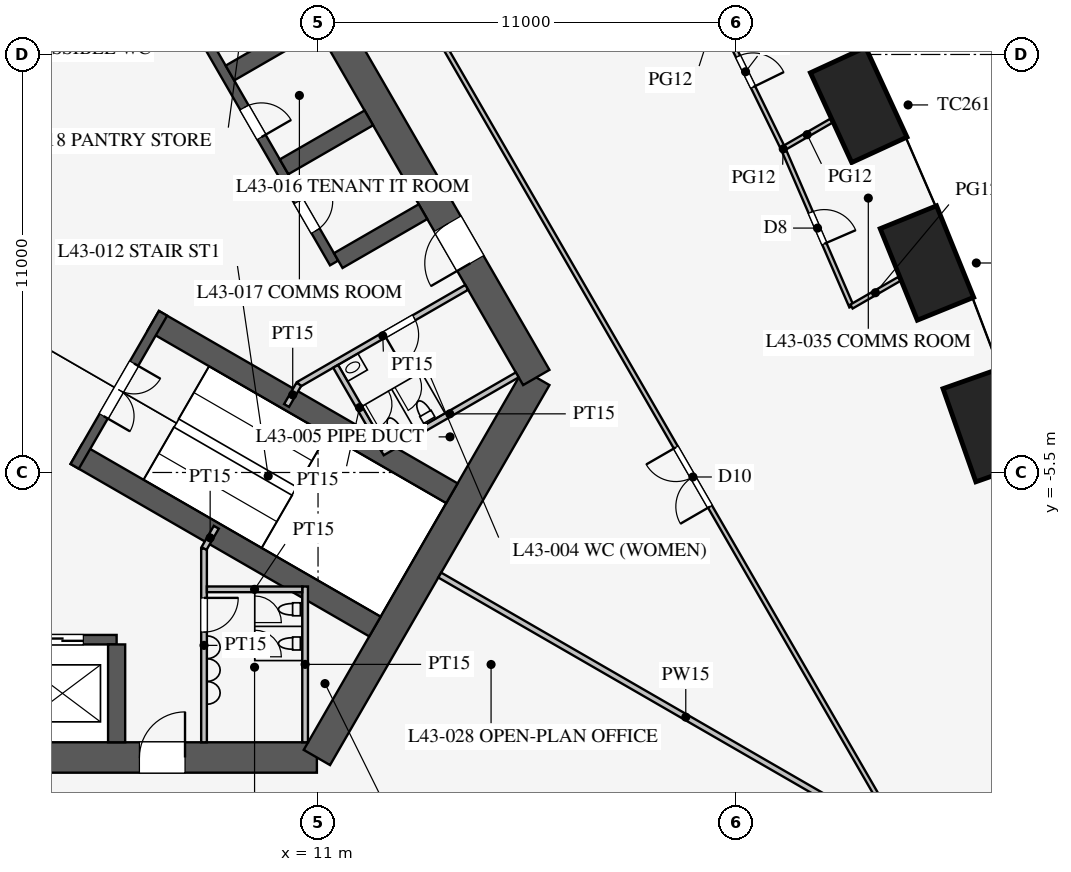
"""IFC4 building model, lengths in metres.
Left out: names, types, materials, properties, quantities, classifications, styles, units other than length and angle.
Written with IfcOpenShell. Run it as: python <this file> out.ifc"""

import sys

from ifc_helpers import new_model, si_unit, direction, frame, frame_2d, origin, origin_2d, place, context, subcontext, project, spatial, rectangle, extrude, element, fill, save


model = new_model("IFC4")
c1 = context("Model", 3, precision=1e-05, world=origin(), true_north=direction((0.0, 1.0)))
c2 = subcontext(c1, "Body", "Model", "MODEL_VIEW")
j1 = project(units=[si_unit("LENGTHUNIT", "METRE"), si_unit("PLANEANGLEUNIT", "RADIAN")], contexts=[c1])
p1 = place(None, origin())
s1 = spatial("IfcSite", under=j1, at=p1, CompositionType="ELEMENT")
p2 = place(p1, origin())
s2 = spatial("IfcBuilding", under=s1, at=p2, CompositionType="ELEMENT")
p3 = place(p2, frame((0.0, 0.0, 189.7)))
s3 = spatial("IfcBuildingStorey", under=s2, at=p3, CompositionType="ELEMENT", Elevation=189.7)
for number, where, z_axis, x_axis in (
    (1, (28.632, -4.254, 0.0), (0.0, 0.0, 1.0), (-0.332, 0.943, 0.0)),
    (2, (27.022, 0.013, 0.0), (0.0, 0.0, 1.0), (-0.376, 0.927, 0.0)),
    (3, (25.227, 4.172, 0.0), (0.0, 0.0, 1.0), (-0.418, 0.908, 0.0)),
):
    element("IfcColumn", number, at=place(p3, frame(where, z_axis=z_axis, x_axis=x_axis)), inside=s3, PredefinedType="COLUMN", context=c2, shape_type="SweptSolid", body=[
        extrude(rectangle(XDim=2.6, YDim=1.6, at=origin_2d()), origin(), (0.0, 0.0, 1.0), 4.2),
    ])
p4 = place(p3, frame((-10.97, -13.0, 0.0), z_axis=(0.0, 0.0, 1.0), x_axis=(1.0, 0.0, 0.0)))
e4 = element("IfcWall", 4, at=p4, inside=s3, PredefinedType="SHEAR", context=c2, shape_type="SweptSolid", body=[
    extrude(rectangle(XDim=21.939, YDim=0.8, at=frame_2d((10.97, 0.0))), origin(), (0.0, 0.0, 1.0), 4.2),
])
p5 = place(p4, frame((17.27, 0.0, 0.0)))
e5 = element("IfcOpeningElement", 5, at=p5, cuts=e4, PredefinedType="OPENING", context=c2, shape_type="SweptSolid", body=[
    extrude(rectangle(XDim=1.2, YDim=2.1, at=frame_2d((0.6, 1.05))), frame((0.0, 0.41, 0.0), z_axis=(0.0, -1.0, 0.0), x_axis=(1.0, 0.0, 0.0)), (0.0, 0.0, 1.0), 0.82),
])
p6 = place(p4, frame((3.47, 0.0, 0.0)))
e6 = element("IfcOpeningElement", 6, at=p6, cuts=e4, PredefinedType="OPENING", context=c2, shape_type="SweptSolid", body=[
    extrude(rectangle(XDim=1.2, YDim=2.1, at=frame_2d((0.6, 1.05))), frame((0.0, 0.41, 0.0), z_axis=(0.0, -1.0, 0.0), x_axis=(1.0, 0.0, 0.0)), (0.0, 0.0, 1.0), 0.82),
])
p7 = place(p3, frame((10.97, -13.0, 0.0), z_axis=(0.0, 0.0, 1.0), x_axis=(0.499995765644, 0.866027848477, 0.0)))
e7 = element("IfcWall", 7, at=p7, inside=s3, PredefinedType="SHEAR", context=c2, shape_type="SweptSolid", body=[
    extrude(rectangle(XDim=11.547, YDim=0.8, at=frame_2d((5.773, 0.0))), origin(), (0.0, 0.0, 1.0), 4.2),
])
p8 = place(p3, frame((16.743, -3.0, 0.0), z_axis=(0.0, 0.0, 1.0), x_axis=(-0.500002442456, 0.866023993627, 0.0)))
e8 = element("IfcWall", 8, at=p8, inside=s3, PredefinedType="SHEAR", context=c2, shape_type="SweptSolid", body=[
    extrude(rectangle(XDim=21.939, YDim=0.8, at=frame_2d((10.97, 0.0))), origin(), (0.0, 0.0, 1.0), 4.2),
])
p9 = place(p8, frame((17.27, 0.0, 0.0)))
e9 = element("IfcOpeningElement", 9, at=p9, cuts=e8, PredefinedType="OPENING", context=c2, shape_type="SweptSolid", body=[
    extrude(rectangle(XDim=1.2, YDim=2.1, at=frame_2d((0.6, 1.05))), frame((0.0, 0.41, 0.0), z_axis=(0.0, -1.0, 0.0), x_axis=(1.0, 0.0, 0.0)), (0.0, 0.0, 1.0), 0.82),
])
p10 = place(p8, frame((3.47, 0.0, 0.0)))
e10 = element("IfcOpeningElement", 10, at=p10, cuts=e8, PredefinedType="OPENING", context=c2, shape_type="SweptSolid", body=[
    extrude(rectangle(XDim=1.2, YDim=2.1, at=frame_2d((0.6, 1.05))), frame((0.0, 0.41, 0.0), z_axis=(0.0, -1.0, 0.0), x_axis=(1.0, 0.0, 0.0)), (0.0, 0.0, 1.0), 0.82),
])
p11 = place(p3, frame((-5.7, -9.9, 0.0), z_axis=(0.0, 0.0, 1.0), x_axis=(1.0, 0.0, 0.0)))
e11 = element("IfcWall", 11, at=p11, inside=s3, PredefinedType="SHEAR", context=c2, shape_type="SweptSolid", body=[
    extrude(rectangle(XDim=11.4, YDim=0.25, at=frame_2d((5.7, 0.0))), origin(), (0.0, 0.0, 1.0), 4.2),
])
p12 = place(p11, frame((0.875, 0.0, 0.0)))
e12 = element("IfcOpeningElement", 12, at=p12, cuts=e11, PredefinedType="OPENING", context=c2, shape_type="SweptSolid", body=[
    extrude(rectangle(XDim=1.1, YDim=2.2, at=frame_2d((0.55, 1.1))), frame((0.0, 0.135, 0.0), z_axis=(0.0, -1.0, 0.0), x_axis=(1.0, 0.0, 0.0)), (0.0, 0.0, 1.0), 0.27),
])
p13 = place(p11, frame((3.725, 0.0, 0.0)))
e13 = element("IfcOpeningElement", 13, at=p13, cuts=e11, PredefinedType="OPENING", context=c2, shape_type="SweptSolid", body=[
    extrude(rectangle(XDim=1.1, YDim=2.2, at=frame_2d((0.55, 1.1))), frame((0.0, 0.135, 0.0), z_axis=(0.0, -1.0, 0.0), x_axis=(1.0, 0.0, 0.0)), (0.0, 0.0, 1.0), 0.27),
])
p14 = place(p11, frame((6.575, 0.0, 0.0)))
e14 = element("IfcOpeningElement", 14, at=p14, cuts=e11, PredefinedType="OPENING", context=c2, shape_type="SweptSolid", body=[
    extrude(rectangle(XDim=1.1, YDim=2.2, at=frame_2d((0.55, 1.1))), frame((0.0, 0.135, 0.0), z_axis=(0.0, -1.0, 0.0), x_axis=(1.0, 0.0, 0.0)), (0.0, 0.0, 1.0), 0.27),
])
p15 = place(p11, frame((9.425, 0.0, 0.0)))
e15 = element("IfcOpeningElement", 15, at=p15, cuts=e11, PredefinedType="OPENING", context=c2, shape_type="SweptSolid", body=[
    extrude(rectangle(XDim=1.1, YDim=2.2, at=frame_2d((0.55, 1.1))), frame((0.0, 0.135, 0.0), z_axis=(0.0, -1.0, 0.0), x_axis=(1.0, 0.0, 0.0)), (0.0, 0.0, 1.0), 0.27),
])
p16 = place(p3, frame((5.7, -10.025, 0.0), z_axis=(0.0, 0.0, 1.0), x_axis=(0.0, -1.0, 0.0)))
e16 = element("IfcWall", 16, at=p16, inside=s3, PredefinedType="SHEAR", context=c2, shape_type="SweptSolid", body=[
    extrude(rectangle(XDim=2.575, YDim=0.45, at=frame_2d((1.288, 0.0))), origin(), (0.0, 0.0, 1.0), 4.2),
])
p17 = place(p3, frame((11.424, 0.014, 0.0), z_axis=(0.0, 0.0, 1.0), x_axis=(-0.500001763848, 0.866024385424, 0.0)))
e17 = element("IfcWall", 17, at=p17, inside=s3, PredefinedType="SHEAR", context=c2, shape_type="SweptSolid", body=[
    extrude(rectangle(XDim=11.4, YDim=0.25, at=frame_2d((5.7, 0.0))), origin(), (0.0, 0.0, 1.0), 4.2),
])
p18 = place(p17, frame((0.975, 0.0, 0.0)))
e18 = element("IfcOpeningElement", 18, at=p18, cuts=e17, PredefinedType="OPENING", context=c2, shape_type="SweptSolid", body=[
    extrude(rectangle(XDim=0.9, YDim=2.1, at=frame_2d((0.45, 1.05))), frame((0.0, 0.135, 0.0), z_axis=(0.0, -1.0, 0.0), x_axis=(1.0, 0.0, 0.0)), (0.0, 0.0, 1.0), 0.27),
])
p19 = place(p17, frame((3.825, 0.0, 0.0)))
e19 = element("IfcOpeningElement", 19, at=p19, cuts=e17, PredefinedType="OPENING", context=c2, shape_type="SweptSolid", body=[
    extrude(rectangle(XDim=0.9, YDim=2.1, at=frame_2d((0.45, 1.05))), frame((0.0, 0.135, 0.0), z_axis=(0.0, -1.0, 0.0), x_axis=(1.0, 0.0, 0.0)), (0.0, 0.0, 1.0), 0.27),
])
p20 = place(p17, frame((6.675, 0.0, 0.0)))
e20 = element("IfcOpeningElement", 20, at=p20, cuts=e17, PredefinedType="OPENING", context=c2, shape_type="SweptSolid", body=[
    extrude(rectangle(XDim=0.9, YDim=2.1, at=frame_2d((0.45, 1.05))), frame((0.0, 0.135, 0.0), z_axis=(0.0, -1.0, 0.0), x_axis=(1.0, 0.0, 0.0)), (0.0, 0.0, 1.0), 0.27),
])
p21 = place(p17, frame((9.525, 0.0, 0.0)))
e21 = element("IfcOpeningElement", 21, at=p21, cuts=e17, PredefinedType="OPENING", context=c2, shape_type="SweptSolid", body=[
    extrude(rectangle(XDim=0.9, YDim=2.1, at=frame_2d((0.45, 1.05))), frame((0.0, 0.135, 0.0), z_axis=(0.0, -1.0, 0.0), x_axis=(1.0, 0.0, 0.0)), (0.0, 0.0, 1.0), 0.27),
])
for number, where, z_axis, x_axis in (
    (22, (11.532, 0.076, 0.0), (0.0, 0.0, 1.0), (0.866, 0.5, 0.0)),
    (23, (10.107, 2.544, 0.0), (0.0, 0.0, 1.0), (0.866, 0.5, 0.0)),
    (24, (8.682, 5.012, 0.0), (0.0, 0.0, 1.0), (0.866, 0.5, 0.0)),
):
    element("IfcWall", number, at=place(p3, frame(where, z_axis=z_axis, x_axis=x_axis)), inside=s3, PredefinedType="SHEAR", context=c2, shape_type="SweptSolid", body=[
        extrude(rectangle(XDim=2.575, YDim=0.45, at=frame_2d((1.288, 0.0))), origin(), (0.0, 0.0, 1.0), 4.2),
    ])
for number, where, z_axis, x_axis in (
    (25, (4.638, -5.016, 0.0), (0.0, 0.0, 1.0), (0.866, -0.5, 0.0)),
    (26, (6.663, -1.509, 0.0), (0.0, 0.0, 1.0), (0.866, -0.5, 0.0)),
):
    element("IfcWall", number, at=place(p3, frame(where, z_axis=z_axis, x_axis=x_axis)), inside=s3, PredefinedType="SHEAR", context=c2, shape_type="SweptSolid", body=[
        extrude(rectangle(XDim=9.075, YDim=0.6, at=frame_2d((4.538, 0.0))), origin(), (0.0, 0.0, 1.0), 4.2),
    ])
p22 = place(p3, frame((4.597, -5.339, 0.0), z_axis=(0.0, 0.0, 1.0), x_axis=(0.499984536904, 0.866034331223, 0.0)))
e27 = element("IfcWall", 27, at=p22, inside=s3, PredefinedType="SHEAR", context=c2, shape_type="SweptSolid", body=[
    extrude(rectangle(XDim=4.65, YDim=0.25, at=frame_2d((2.325, 0.0))), origin(), (0.0, 0.0, 1.0), 4.2),
])
p23 = place(p22, frame((1.525, 0.0, 0.0)))
e28 = element("IfcOpeningElement", 28, at=p23, cuts=e27, PredefinedType="OPENING", context=c2, shape_type="SweptSolid", body=[
    extrude(rectangle(XDim=1.6, YDim=2.1, at=frame_2d((0.8, 1.05))), frame((0.0, 0.135, 0.0), z_axis=(0.0, -1.0, 0.0), x_axis=(1.0, 0.0, 0.0)), (0.0, 0.0, 1.0), 0.27),
])
p24 = place(p3, frame((8.0, -7.5, 0.0), z_axis=(0.0, 0.0, 1.0), x_axis=(0.0, -1.0, 0.0)))
e29 = element("IfcWall", 29, at=p24, inside=s3, PredefinedType="PARTITIONING", context=c2, shape_type="SweptSolid", body=[
    extrude(rectangle(XDim=5.1, YDim=0.15, at=frame_2d((2.55, 0.0))), origin(), (0.0, 0.0, 1.0), 4.0),
])
p25 = place(p24, frame((1.3, 0.0, 0.0)))
e30 = element("IfcOpeningElement", 30, at=p25, cuts=e29, PredefinedType="OPENING", context=c2, shape_type="SweptSolid", body=[
    extrude(rectangle(XDim=0.9, YDim=2.1, at=frame_2d((0.45, 1.05))), frame((0.0, 0.085, 0.0), z_axis=(0.0, -1.0, 0.0), x_axis=(1.0, 0.0, 0.0)), (0.0, 0.0, 1.0), 0.17),
])
p26 = place(p3, frame((10.495, -3.178, 0.0), z_axis=(0.0, 0.0, 1.0), x_axis=(0.86602216432, 0.500005610874, 0.0)))
e31 = element("IfcWall", 31, at=p26, inside=s3, PredefinedType="PARTITIONING", context=c2, shape_type="SweptSolid", body=[
    extrude(rectangle(XDim=5.1, YDim=0.15, at=frame_2d((2.55, 0.0))), origin(), (0.0, 0.0, 1.0), 4.0),
])
p27 = place(p26, frame((2.6, 0.0, 0.0)))
e32 = element("IfcOpeningElement", 32, at=p27, cuts=e31, PredefinedType="OPENING", context=c2, shape_type="SweptSolid", body=[
    extrude(rectangle(XDim=0.9, YDim=2.1, at=frame_2d((0.45, 1.05))), frame((0.0, 0.085, 0.0), z_axis=(0.0, -1.0, 0.0), x_axis=(1.0, 0.0, 0.0)), (0.0, 0.0, 1.0), 0.17),
])
for number, where, z_axis, x_axis in (
    (33, (8.0, -7.5, 0.0), (0.0, 0.0, 1.0), (0.5, 0.866, 0.0)),
    (34, (10.495, -3.178, 0.0), (0.0, 0.0, 1.0), (-0.5, -0.866, 0.0)),
):
    element("IfcWall", number, at=place(p3, frame(where, z_axis=z_axis, x_axis=x_axis)), inside=s3, PredefinedType="PARTITIONING", context=c2, shape_type="SweptSolid", body=[
        extrude(rectangle(XDim=0.645, YDim=0.15, at=frame_2d((0.323, 0.0))), origin(), (0.0, 0.0, 1.0), 4.0),
    ])
p28 = place(p3, frame((10.66, -8.5, 0.0), z_axis=(0.0, 0.0, 1.0), x_axis=(0.0, -1.0, 0.0)))
e35 = element("IfcWall", 35, at=p28, inside=s3, PredefinedType="PARTITIONING", context=c2, shape_type="SweptSolid", body=[
    extrude(rectangle(XDim=4.1, YDim=0.15, at=frame_2d((2.05, 0.0))), origin(), (0.0, 0.0, 1.0), 4.0),
])
p29 = place(p3, frame((8.075, -8.575, 0.0), z_axis=(0.0, 0.0, 1.0), x_axis=(1.0, 0.0, 0.0)))
e36 = element("IfcWall", 36, at=p29, inside=s3, PredefinedType="PARTITIONING", context=c2, shape_type="SweptSolid", body=[
    extrude(rectangle(XDim=2.51, YDim=0.15, at=frame_2d((1.255, 0.0))), origin(), (0.0, 0.0, 1.0), 4.0),
])
p30 = place(p3, frame((12.691, -4.982, 0.0), z_axis=(0.0, 0.0, 1.0), x_axis=(0.8660249478, 0.500000789788, 0.0)))
e37 = element("IfcWall", 37, at=p30, inside=s3, PredefinedType="PARTITIONING", context=c2, shape_type="SweptSolid", body=[
    extrude(rectangle(XDim=4.1, YDim=0.15, at=frame_2d((2.05, 0.0))), origin(), (0.0, 0.0, 1.0), 4.0),
])
p31 = place(p3, frame((11.464, -2.706, 0.0), z_axis=(0.0, 0.0, 1.0), x_axis=(0.50001992892, -0.866013897511, 0.0)))
e38 = element("IfcWall", 38, at=p31, inside=s3, PredefinedType="PARTITIONING", context=c2, shape_type="SweptSolid", body=[
    extrude(rectangle(XDim=2.51, YDim=0.15, at=frame_2d((1.255, 0.0))), origin(), (0.0, 0.0, 1.0), 4.0),
])
p32 = place(p3, frame((14.203, -8.2, 0.0), z_axis=(0.0, 0.0, 1.0), x_axis=(0.866021600284, -0.500006587798, 0.0)))
e39 = element("IfcWall", 39, at=p32, inside=s3, PredefinedType="PARTITIONING", context=c2, shape_type="SweptSolid", body=[
    extrude(rectangle(XDim=14.95, YDim=0.15, at=frame_2d((7.475, 0.0))), origin(), (0.0, 0.0, 1.0), 2.4),
])
p33 = place(p3, frame((26.415, -15.231, 0.0), z_axis=(0.0, 0.0, 1.0), x_axis=(-0.50000091641, 0.866024874695, 0.0)))
e40 = element("IfcWall", 40, at=p33, inside=s3, PredefinedType="PARTITIONING", context=c2, shape_type="SweptSolid", body=[
    extrude(rectangle(XDim=52.796, YDim=0.12, at=frame_2d((26.398, 0.0))), origin(), (0.0, 0.0, 1.0), 2.9),
])
p34 = place(p33, frame((10.2, 0.0, 0.15)))
e41 = element("IfcOpeningElement", 41, at=p34, cuts=e40, PredefinedType="OPENING", context=c2, shape_type="SweptSolid", body=[
    extrude(rectangle(XDim=1.8, YDim=2.1, at=frame_2d((0.9, 1.05))), frame((0.0, 0.07, 0.0), z_axis=(0.0, -1.0, 0.0), x_axis=(1.0, 0.0, 0.0)), (0.0, 0.0, 1.0), 0.14),
])
p35 = place(p33, frame((40.8, 0.0, 0.15)))
e42 = element("IfcOpeningElement", 42, at=p35, cuts=e40, PredefinedType="OPENING", context=c2, shape_type="SweptSolid", body=[
    extrude(rectangle(XDim=1.8, YDim=2.1, at=frame_2d((0.9, 1.05))), frame((0.0, 0.07, 0.0), z_axis=(0.0, -1.0, 0.0), x_axis=(1.0, 0.0, 0.0)), (0.0, 0.0, 1.0), 0.14),
])
p36 = place(p3, frame((25.037, -1.133, 0.0), z_axis=(0.0, 0.0, 1.0), x_axis=(-0.397253491631, 0.917708920839, 0.0)))
e43 = element("IfcWall", 43, at=p36, inside=s3, PredefinedType="PARTITIONING", context=c2, shape_type="SweptSolid", body=[
    extrude(rectangle(XDim=4.53, YDim=0.12, at=frame_2d((2.265, 0.0))), origin(), (0.0, 0.0, 1.0), 2.9),
])
p37 = place(p36, frame((1.8, 0.0, 0.15)))
e44 = element("IfcOpeningElement", 44, at=p37, cuts=e43, PredefinedType="OPENING", context=c2, shape_type="SweptSolid", body=[
    extrude(rectangle(XDim=0.9, YDim=2.1, at=frame_2d((0.45, 1.05))), frame((0.0, 0.07, 0.0), z_axis=(0.0, -1.0, 0.0), x_axis=(1.0, 0.0, 0.0)), (0.0, 0.0, 1.0), 0.14),
])
p38 = place(p3, frame((23.238, 3.024, 0.0), z_axis=(0.0, 0.0, 1.0), x_axis=(-0.43911984878, 0.898428493764, 0.0)))
e45 = element("IfcWall", 45, at=p38, inside=s3, PredefinedType="PARTITIONING", context=c2, shape_type="SweptSolid", body=[
    extrude(rectangle(XDim=4.511, YDim=0.12, at=frame_2d((2.255, 0.0))), origin(), (0.0, 0.0, 1.0), 2.9),
])
p39 = place(p38, frame((1.8, 0.0, 0.15)))
e46 = element("IfcOpeningElement", 46, at=p39, cuts=e45, PredefinedType="OPENING", context=c2, shape_type="SweptSolid", body=[
    extrude(rectangle(XDim=0.9, YDim=2.1, at=frame_2d((0.45, 1.05))), frame((0.0, 0.07, 0.0), z_axis=(0.0, -1.0, 0.0), x_axis=(1.0, 0.0, 0.0)), (0.0, 0.0, 1.0), 0.14),
])
p40 = place(p3, frame((25.037, -1.133, 0.0), z_axis=(0.0, 0.0, 1.0), x_axis=(0.865992696156, 0.500056646995, 0.0)))
e47 = element("IfcWall", 47, at=p40, inside=s3, PredefinedType="PARTITIONING", context=c2, shape_type="SweptSolid", body=[
    extrude(rectangle(XDim=1.454, YDim=0.12, at=frame_2d((0.727, 0.0))), origin(), (0.0, 0.0, 1.0), 2.2),
])
p41 = place(p3, frame((23.238, 3.024, 0.0), z_axis=(0.0, 0.0, 1.0), x_axis=(0.865985511038, 0.5000690899, 0.0)))
e48 = element("IfcWall", 48, at=p41, inside=s3, PredefinedType="PARTITIONING", context=c2, shape_type="SweptSolid", body=[
    extrude(rectangle(XDim=1.463, YDim=0.12, at=frame_2d((0.731, 0.0))), origin(), (0.0, 0.0, 1.0), 2.6),
])
p42 = place(p25, origin())
e49 = element("IfcDoor", 49, at=p42, inside=s3, OperationType="SINGLE_SWING_LEFT", PredefinedType="DOOR", context=c2, shape_type="SweptSolid", body=[
    extrude(rectangle(XDim=0.9, YDim=2.1, at=frame_2d((0.45, 1.05))), frame((0.0, 0.025, 0.0), z_axis=(0.0, -1.0, 0.0), x_axis=(1.0, 0.0, 0.0)), (0.0, 0.0, 1.0), 0.05),
])
fill(e30, e49)
p43 = place(p27, frame((0.9, 0.0, 0.0), z_axis=(0.0, 0.0, 1.0), x_axis=(-1.0, 0.0, 0.0)))
e50 = element("IfcDoor", 50, at=p43, inside=s3, OperationType="SINGLE_SWING_RIGHT", PredefinedType="DOOR", context=c2, shape_type="SweptSolid", body=[
    extrude(rectangle(XDim=0.9, YDim=2.1, at=frame_2d((0.45, 1.05))), frame((0.0, 0.025, 0.0), z_axis=(0.0, -1.0, 0.0), x_axis=(1.0, 0.0, 0.0)), (0.0, 0.0, 1.0), 0.05),
])
fill(e32, e50)
p44 = place(p23, frame((1.6, 0.0, 0.0), z_axis=(0.0, 0.0, 1.0), x_axis=(-1.0, 0.0, 0.0)))
e51 = element("IfcDoor", 51, at=p44, inside=s3, OperationType="DOUBLE_DOOR_SINGLE_SWING", PredefinedType="DOOR", context=c2, shape_type="SweptSolid", body=[
    extrude(rectangle(XDim=1.6, YDim=2.1, at=frame_2d((0.8, 1.05))), frame((0.0, 0.025, 0.0), z_axis=(0.0, -1.0, 0.0), x_axis=(1.0, 0.0, 0.0)), (0.0, 0.0, 1.0), 0.05),
])
fill(e28, e51)
p45 = place(p5, origin())
e52 = element("IfcDoor", 52, at=p45, inside=s3, OperationType="SINGLE_SWING_RIGHT", PredefinedType="DOOR", context=c2, shape_type="SweptSolid", body=[
    extrude(rectangle(XDim=1.2, YDim=2.1, at=frame_2d((0.6, 1.05))), frame((0.0, 0.025, 0.0), z_axis=(0.0, -1.0, 0.0), x_axis=(1.0, 0.0, 0.0)), (0.0, 0.0, 1.0), 0.05),
])
fill(e5, e52)
p46 = place(p10, origin())
e53 = element("IfcDoor", 53, at=p46, inside=s3, OperationType="SINGLE_SWING_LEFT", PredefinedType="DOOR", context=c2, shape_type="SweptSolid", body=[
    extrude(rectangle(XDim=1.2, YDim=2.1, at=frame_2d((0.6, 1.05))), frame((0.0, 0.025, 0.0), z_axis=(0.0, -1.0, 0.0), x_axis=(1.0, 0.0, 0.0)), (0.0, 0.0, 1.0), 0.05),
])
fill(e10, e53)
p47 = place(p18, frame((0.9, 0.0, 0.0), z_axis=(0.0, 0.0, 1.0), x_axis=(-1.0, 0.0, 0.0)))
e54 = element("IfcDoor", 54, at=p47, inside=s3, OperationType="SINGLE_SWING_LEFT", PredefinedType="DOOR", context=c2, shape_type="SweptSolid", body=[
    extrude(rectangle(XDim=0.9, YDim=2.1, at=frame_2d((0.45, 1.05))), frame((0.0, 0.025, 0.0), z_axis=(0.0, -1.0, 0.0), x_axis=(1.0, 0.0, 0.0)), (0.0, 0.0, 1.0), 0.05),
])
fill(e18, e54)
p48 = place(p19, frame((0.9, 0.0, 0.0), z_axis=(0.0, 0.0, 1.0), x_axis=(-1.0, 0.0, 0.0)))
e55 = element("IfcDoor", 55, at=p48, inside=s3, OperationType="SINGLE_SWING_RIGHT", PredefinedType="DOOR", context=c2, shape_type="SweptSolid", body=[
    extrude(rectangle(XDim=0.9, YDim=2.1, at=frame_2d((0.45, 1.05))), frame((0.0, 0.025, 0.0), z_axis=(0.0, -1.0, 0.0), x_axis=(1.0, 0.0, 0.0)), (0.0, 0.0, 1.0), 0.05),
])
fill(e19, e55)
p49 = place(p39, frame((0.9, 0.0, 0.0), z_axis=(0.0, 0.0, 1.0), x_axis=(-1.0, 0.0, 0.0)))
e56 = element("IfcDoor", 56, at=p49, inside=s3, OperationType="SINGLE_SWING_RIGHT", PredefinedType="DOOR", context=c2, shape_type="SweptSolid", body=[
    extrude(rectangle(XDim=0.9, YDim=2.1, at=frame_2d((0.45, 1.05))), frame((0.0, 0.025, 0.0), z_axis=(0.0, -1.0, 0.0), x_axis=(1.0, 0.0, 0.0)), (0.0, 0.0, 1.0), 0.05),
])
fill(e46, e56)
p50 = place(p37, frame((0.9, 0.0, 0.0), z_axis=(0.0, 0.0, 1.0), x_axis=(-1.0, 0.0, 0.0)))
e57 = element("IfcDoor", 57, at=p50, inside=s3, OperationType="SINGLE_SWING_RIGHT", PredefinedType="DOOR", context=c2, shape_type="SweptSolid", body=[
    extrude(rectangle(XDim=0.9, YDim=2.1, at=frame_2d((0.45, 1.05))), frame((0.0, 0.025, 0.0), z_axis=(0.0, -1.0, 0.0), x_axis=(1.0, 0.0, 0.0)), (0.0, 0.0, 1.0), 0.05),
])
fill(e44, e57)
p51 = place(p34, origin())
e58 = element("IfcDoor", 58, at=p51, inside=s3, OperationType="DOUBLE_DOOR_SINGLE_SWING", PredefinedType="DOOR", context=c2, shape_type="SweptSolid", body=[
    extrude(rectangle(XDim=1.8, YDim=2.1, at=frame_2d((0.9, 1.05))), frame((0.0, 0.025, 0.0), z_axis=(0.0, -1.0, 0.0), x_axis=(1.0, 0.0, 0.0)), (0.0, 0.0, 1.0), 0.05),
])
fill(e41, e58)
p52 = place(p15, origin())
e59 = element("IfcDoor", 59, at=p52, inside=s3, OperationType="DOUBLE_DOOR_SLIDING", PredefinedType="DOOR", context=c2, shape_type="SweptSolid", body=[
    extrude(rectangle(XDim=1.1, YDim=2.2, at=frame_2d((0.55, 1.1))), frame((0.0, 0.025, 0.0), z_axis=(0.0, -1.0, 0.0), x_axis=(1.0, 0.0, 0.0)), (0.0, 0.0, 1.0), 0.05),
])
fill(e15, e59)
save(model, sys.argv[1])
